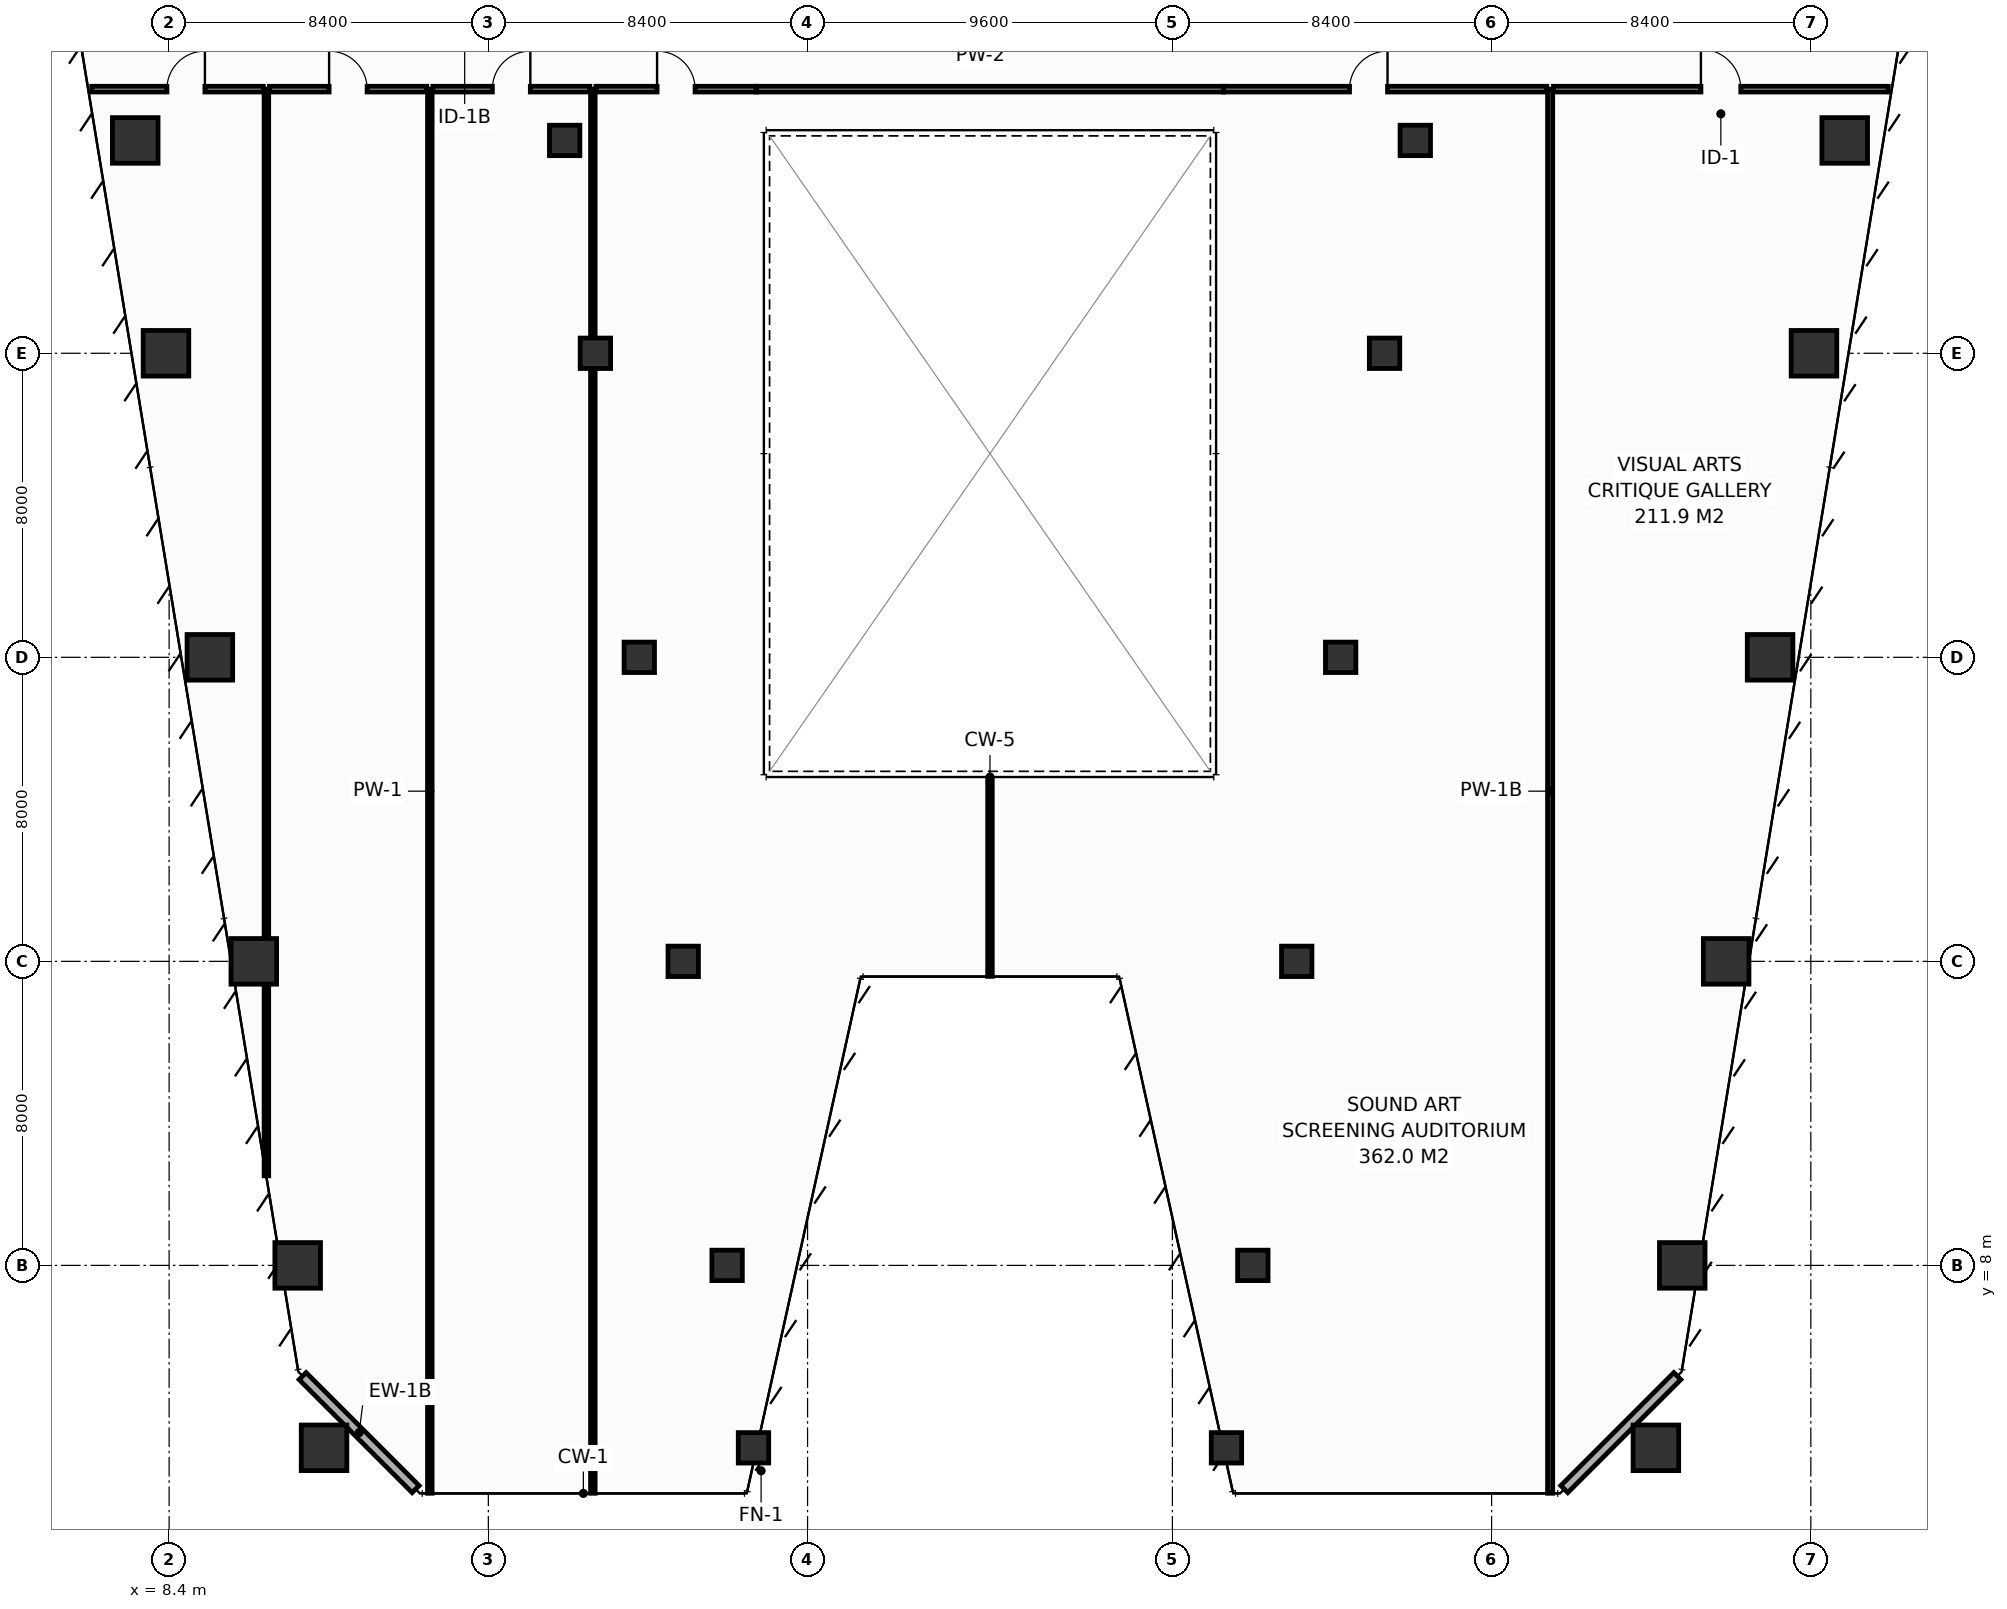
"""IFC4 building model, lengths in metres.
Left out: names, types, materials, properties, quantities, classifications, styles, units other than length and angle.
Written with IfcOpenShell. Run it as: python <this file> out.ifc"""

import sys

from ifc_helpers import new_model, si_unit, direction, frame, frame_2d, origin, origin_2d, place, context, subcontext, project, spatial, rectangle, hollow_rectangle, extrude, element, fill, save


model = new_model("IFC4")
c1 = context("Model", 3, precision=1e-05, world=origin(), true_north=direction((0.0, 1.0)))
c2 = subcontext(c1, "Body", "Model", "MODEL_VIEW")
j1 = project(units=[si_unit("LENGTHUNIT", "METRE"), si_unit("PLANEANGLEUNIT", "RADIAN")], contexts=[c1])
p1 = place(None, origin())
s1 = spatial("IfcSite", under=j1, at=p1, CompositionType="ELEMENT")
p2 = place(p1, origin())
s2 = spatial("IfcBuilding", under=s1, at=p2, CompositionType="ELEMENT")
p3 = place(p2, frame((0.0, 0.0, 82.4)))
s3 = spatial("IfcBuildingStorey", under=s2, at=p3, CompositionType="ELEMENT", Elevation=82.4)
for number, where, z_axis, x_axis in (
    (1, (12.477, 3.2, 0.0), (0.0, 0.0, 1.0), (1.0, 0.0, 0.0)),
    (2, (47.523, 3.2, 0.0), (0.0, 0.0, 1.0), (1.0, 0.0, 0.0)),
):
    element("IfcColumn", number, at=place(p3, frame(where, z_axis=z_axis, x_axis=x_axis)), inside=s3, PredefinedType="COLUMN", context=c2, shape_type="SweptSolid", body=[
        extrude(hollow_rectangle(XDim=1.2, YDim=1.2, WallThickness=0.055, at=origin_2d()), origin(), (0.0, 0.0, 1.0), 4.4),
    ])
for number, where, z_axis, x_axis in (
    (3, (23.777, 3.2, 0.0), (0.0, 0.0, 1.0), (1.0, 0.0, 0.0)),
    (4, (36.223, 3.2, 0.0), (0.0, 0.0, 1.0), (1.0, 0.0, 0.0)),
):
    element("IfcColumn", number, at=place(p3, frame(where, z_axis=z_axis, x_axis=x_axis)), inside=s3, PredefinedType="COLUMN", context=c2, shape_type="SweptSolid", body=[
        extrude(hollow_rectangle(XDim=0.8, YDim=0.8, WallThickness=0.036, at=origin_2d()), origin(), (0.0, 0.0, 1.0), 4.4),
    ])
for number, where, z_axis, x_axis in (
    (5, (11.783, 8.0, 0.0), (0.0, 0.0, 1.0), (1.0, 0.0, 0.0)),
    (6, (48.217, 8.0, 0.0), (0.0, 0.0, 1.0), (1.0, 0.0, 0.0)),
):
    element("IfcColumn", number, at=place(p3, frame(where, z_axis=z_axis, x_axis=x_axis)), inside=s3, PredefinedType="COLUMN", context=c2, shape_type="SweptSolid", body=[
        extrude(hollow_rectangle(XDim=1.2, YDim=1.2, WallThickness=0.055, at=origin_2d()), origin(), (0.0, 0.0, 1.0), 4.4),
    ])
for number, where, z_axis, x_axis in (
    (7, (23.083, 8.0, 0.0), (0.0, 0.0, 1.0), (1.0, 0.0, 0.0)),
    (8, (36.917, 8.0, 0.0), (0.0, 0.0, 1.0), (1.0, 0.0, 0.0)),
):
    element("IfcColumn", number, at=place(p3, frame(where, z_axis=z_axis, x_axis=x_axis)), inside=s3, PredefinedType="COLUMN", context=c2, shape_type="SweptSolid", body=[
        extrude(hollow_rectangle(XDim=0.8, YDim=0.8, WallThickness=0.036, at=origin_2d()), origin(), (0.0, 0.0, 1.0), 4.4),
    ])
for number, where, z_axis, x_axis in (
    (9, (10.628, 16.0, 0.0), (0.0, 0.0, 1.0), (1.0, 0.0, 0.0)),
    (10, (49.372, 16.0, 0.0), (0.0, 0.0, 1.0), (1.0, 0.0, 0.0)),
):
    element("IfcColumn", number, at=place(p3, frame(where, z_axis=z_axis, x_axis=x_axis)), inside=s3, PredefinedType="COLUMN", context=c2, shape_type="SweptSolid", body=[
        extrude(hollow_rectangle(XDim=1.2, YDim=1.2, WallThickness=0.055, at=origin_2d()), origin(), (0.0, 0.0, 1.0), 4.4),
    ])
for number, where, z_axis, x_axis in (
    (11, (21.928, 16.0, 0.0), (0.0, 0.0, 1.0), (1.0, 0.0, 0.0)),
    (12, (38.072, 16.0, 0.0), (0.0, 0.0, 1.0), (1.0, 0.0, 0.0)),
):
    element("IfcColumn", number, at=place(p3, frame(where, z_axis=z_axis, x_axis=x_axis)), inside=s3, PredefinedType="COLUMN", context=c2, shape_type="SweptSolid", body=[
        extrude(hollow_rectangle(XDim=0.8, YDim=0.8, WallThickness=0.036, at=origin_2d()), origin(), (0.0, 0.0, 1.0), 4.4),
    ])
for number, where, z_axis, x_axis in (
    (13, (9.472, 24.0, 0.0), (0.0, 0.0, 1.0), (1.0, 0.0, 0.0)),
    (14, (50.528, 24.0, 0.0), (0.0, 0.0, 1.0), (1.0, 0.0, 0.0)),
):
    element("IfcColumn", number, at=place(p3, frame(where, z_axis=z_axis, x_axis=x_axis)), inside=s3, PredefinedType="COLUMN", context=c2, shape_type="SweptSolid", body=[
        extrude(hollow_rectangle(XDim=1.2, YDim=1.2, WallThickness=0.055, at=origin_2d()), origin(), (0.0, 0.0, 1.0), 4.4),
    ])
for number, where, z_axis, x_axis in (
    (15, (20.772, 24.0, 0.0), (0.0, 0.0, 1.0), (1.0, 0.0, 0.0)),
    (16, (39.228, 24.0, 0.0), (0.0, 0.0, 1.0), (1.0, 0.0, 0.0)),
):
    element("IfcColumn", number, at=place(p3, frame(where, z_axis=z_axis, x_axis=x_axis)), inside=s3, PredefinedType="COLUMN", context=c2, shape_type="SweptSolid", body=[
        extrude(hollow_rectangle(XDim=0.8, YDim=0.8, WallThickness=0.036, at=origin_2d()), origin(), (0.0, 0.0, 1.0), 4.4),
    ])
for number, where, z_axis, x_axis in (
    (17, (8.317, 32.0, 0.0), (0.0, 0.0, 1.0), (1.0, 0.0, 0.0)),
    (18, (51.683, 32.0, 0.0), (0.0, 0.0, 1.0), (1.0, 0.0, 0.0)),
):
    element("IfcColumn", number, at=place(p3, frame(where, z_axis=z_axis, x_axis=x_axis)), inside=s3, PredefinedType="COLUMN", context=c2, shape_type="SweptSolid", body=[
        extrude(hollow_rectangle(XDim=1.2, YDim=1.2, WallThickness=0.055, at=origin_2d()), origin(), (0.0, 0.0, 1.0), 4.4),
    ])
for number, where, z_axis, x_axis in (
    (19, (19.617, 32.0, 0.0), (0.0, 0.0, 1.0), (1.0, 0.0, 0.0)),
    (20, (40.383, 32.0, 0.0), (0.0, 0.0, 1.0), (1.0, 0.0, 0.0)),
):
    element("IfcColumn", number, at=place(p3, frame(where, z_axis=z_axis, x_axis=x_axis)), inside=s3, PredefinedType="COLUMN", context=c2, shape_type="SweptSolid", body=[
        extrude(hollow_rectangle(XDim=0.8, YDim=0.8, WallThickness=0.036, at=origin_2d()), origin(), (0.0, 0.0, 1.0), 4.4),
    ])
for number, where, z_axis, x_axis in (
    (21, (7.508, 37.6, 0.0), (0.0, 0.0, 1.0), (1.0, 0.0, 0.0)),
    (22, (52.492, 37.6, 0.0), (0.0, 0.0, 1.0), (1.0, 0.0, 0.0)),
):
    element("IfcColumn", number, at=place(p3, frame(where, z_axis=z_axis, x_axis=x_axis)), inside=s3, PredefinedType="COLUMN", context=c2, shape_type="SweptSolid", body=[
        extrude(hollow_rectangle(XDim=1.2, YDim=1.2, WallThickness=0.055, at=origin_2d()), origin(), (0.0, 0.0, 1.0), 4.4),
    ])
for number, where, z_axis, x_axis in (
    (23, (18.808, 37.6, 0.0), (0.0, 0.0, 1.0), (1.0, 0.0, 0.0)),
    (24, (41.192, 37.6, 0.0), (0.0, 0.0, 1.0), (1.0, 0.0, 0.0)),
):
    element("IfcColumn", number, at=place(p3, frame(where, z_axis=z_axis, x_axis=x_axis)), inside=s3, PredefinedType="COLUMN", context=c2, shape_type="SweptSolid", body=[
        extrude(hollow_rectangle(XDim=0.8, YDim=0.8, WallThickness=0.036, at=origin_2d()), origin(), (0.0, 0.0, 1.0), 4.4),
    ])
for number, where, z_axis, x_axis in (
    (25, (11.913, 5.087, 0.0), (0.0, 0.0, 1.0), (0.707, -0.707, 0.0)),
    (26, (45.113, 2.113, 0.0), (0.0, 0.0, 1.0), (0.707, 0.707, 0.0)),
):
    element("IfcWall", number, at=place(p3, frame(where, z_axis=z_axis, x_axis=x_axis)), inside=s3, PredefinedType="STANDARD", context=c2, shape_type="SweptSolid", body=[
        extrude(rectangle(XDim=4.206, YDim=0.26, at=frame_2d((2.103, 0.0))), origin(), (0.0, 0.0, 1.0), 3.95),
    ])
p4 = place(p3, frame((10.96, 10.357, 0.0), z_axis=(0.0, 0.0, 1.0), x_axis=(0.0, 1.0, 0.0)))
e27 = element("IfcWall", 27, at=p4, inside=s3, PredefinedType="PARTITIONING", context=c2, shape_type="SweptSolid", body=[
    extrude(rectangle(XDim=28.593, YDim=0.12, at=frame_2d((14.296, 0.0))), origin(), (0.0, 0.0, 1.0), 3.135),
])
for number, where, z_axis, x_axis in (
    (28, (15.26, 2.005, 0.0), (0.0, 0.0, 1.0), (0.0, 1.0, 0.0)),
    (29, (19.55, 2.005, 0.0), (0.0, 0.0, 1.0), (0.0, 1.0, 0.0)),
):
    element("IfcWall", number, at=place(p3, frame(where, z_axis=z_axis, x_axis=x_axis)), inside=s3, PredefinedType="PARTITIONING", context=c2, shape_type="SweptSolid", body=[
        extrude(rectangle(XDim=36.945, YDim=0.12, at=frame_2d((18.473, 0.0))), origin(), (0.0, 0.0, 1.0), 3.135),
    ])
p5 = place(p3, frame((44.74, 2.005, 0.0), z_axis=(0.0, 0.0, 1.0), x_axis=(0.0, 1.0, 0.0)))
e30 = element("IfcWall", 30, at=p5, inside=s3, PredefinedType="PARTITIONING", context=c2, shape_type="SweptSolid", body=[
    extrude(rectangle(XDim=36.945, YDim=0.135, at=frame_2d((18.473, 0.0))), origin(), (0.0, 0.0, 1.0), 3.135),
])
p6 = place(p3, frame((30.0, 15.605, 0.0), z_axis=(0.0, 0.0, 1.0), x_axis=(0.0, 1.0, 0.0)))
e31 = element("IfcWall", 31, at=p6, inside=s3, PredefinedType="PARTITIONING", context=c2, shape_type="SweptSolid", body=[
    extrude(rectangle(XDim=5.175, YDim=0.12, at=frame_2d((2.587, 0.0))), origin(), (0.0, 0.0, 1.0), 3.95),
])
p7 = place(p3, frame((6.363, 38.95, 0.0), z_axis=(0.0, 0.0, 1.0), x_axis=(1.0, 0.0, 0.0)))
e32 = element("IfcWall", 32, at=p7, inside=s3, PredefinedType="PARTITIONING", context=c2, shape_type="SweptSolid", body=[
    extrude(rectangle(XDim=4.517, YDim=0.15, at=frame_2d((2.259, 0.0))), origin(), (0.0, 0.0, 1.0), 3.435),
])
p8 = place(p7, frame((1.979, 0.0, 0.0)))
e33 = element("IfcOpeningElement", 33, at=p8, cuts=e32, PredefinedType="OPENING", context=c2, shape_type="SweptSolid", body=[
    extrude(rectangle(XDim=1.0, YDim=2.15, at=frame_2d((0.5, 1.075))), frame((0.0, 0.085, 0.0), z_axis=(0.0, -1.0, 0.0), x_axis=(1.0, 0.0, 0.0)), (0.0, 0.0, 1.0), 0.17),
])
p9 = place(p3, frame((11.04, 38.95, 0.0), z_axis=(0.0, 0.0, 1.0), x_axis=(1.0, 0.0, 0.0)))
e34 = element("IfcWall", 34, at=p9, inside=s3, PredefinedType="PARTITIONING", context=c2, shape_type="SweptSolid", body=[
    extrude(rectangle(XDim=4.14, YDim=0.15, at=frame_2d((2.07, 0.0))), origin(), (0.0, 0.0, 1.0), 3.95),
])
p10 = place(p9, frame((1.57, 0.0, 0.0)))
e35 = element("IfcOpeningElement", 35, at=p10, cuts=e34, PredefinedType="OPENING", context=c2, shape_type="SweptSolid", body=[
    extrude(rectangle(XDim=1.0, YDim=2.15, at=frame_2d((0.5, 1.075))), frame((0.0, 0.085, 0.0), z_axis=(0.0, -1.0, 0.0), x_axis=(1.0, 0.0, 0.0)), (0.0, 0.0, 1.0), 0.17),
])
p11 = place(p3, frame((15.34, 38.95, 0.0), z_axis=(0.0, 0.0, 1.0), x_axis=(1.0, 0.0, 0.0)))
e36 = element("IfcWall", 36, at=p11, inside=s3, PredefinedType="PARTITIONING", context=c2, shape_type="SweptSolid", body=[
    extrude(rectangle(XDim=4.13, YDim=0.15, at=frame_2d((2.065, 0.0))), origin(), (0.0, 0.0, 1.0), 3.95),
])
p12 = place(p11, frame((1.565, 0.0, 0.0)))
e37 = element("IfcOpeningElement", 37, at=p12, cuts=e36, PredefinedType="OPENING", context=c2, shape_type="SweptSolid", body=[
    extrude(rectangle(XDim=1.0, YDim=2.15, at=frame_2d((0.5, 1.075))), frame((0.0, 0.085, 0.0), z_axis=(0.0, -1.0, 0.0), x_axis=(1.0, 0.0, 0.0)), (0.0, 0.0, 1.0), 0.17),
])
p13 = place(p3, frame((19.63, 38.95, 0.0), z_axis=(0.0, 0.0, 1.0), x_axis=(1.0, 0.0, 0.0)))
e38 = element("IfcWall", 38, at=p13, inside=s3, PredefinedType="PARTITIONING", context=c2, shape_type="SweptSolid", body=[
    extrude(rectangle(XDim=4.22, YDim=0.15, at=frame_2d((2.11, 0.0))), origin(), (0.0, 0.0, 1.0), 3.135),
])
p14 = place(p13, frame((1.61, 0.0, 0.0)))
e39 = element("IfcOpeningElement", 39, at=p14, cuts=e38, PredefinedType="OPENING", context=c2, shape_type="SweptSolid", body=[
    extrude(rectangle(XDim=1.0, YDim=2.15, at=frame_2d((0.5, 1.075))), frame((0.0, 0.085, 0.0), z_axis=(0.0, -1.0, 0.0), x_axis=(1.0, 0.0, 0.0)), (0.0, 0.0, 1.0), 0.17),
])
p15 = place(p3, frame((23.85, 38.95, 0.0), z_axis=(0.0, 0.0, 1.0), x_axis=(1.0, 0.0, 0.0)))
e40 = element("IfcWall", 40, at=p15, inside=s3, PredefinedType="PARTITIONING", context=c2, shape_type="SweptSolid", body=[
    extrude(rectangle(XDim=12.3, YDim=0.15, at=frame_2d((6.15, 0.0))), origin(), (0.0, 0.0, 1.0), 3.95),
])
p16 = place(p3, frame((36.15, 38.95, 0.0), z_axis=(0.0, 0.0, 1.0), x_axis=(1.0, 0.0, 0.0)))
e41 = element("IfcWall", 41, at=p16, inside=s3, PredefinedType="PARTITIONING", context=c2, shape_type="SweptSolid", body=[
    extrude(rectangle(XDim=8.503, YDim=0.15, at=frame_2d((4.251, 0.0))), origin(), (0.0, 0.0, 1.0), 3.135),
])
p17 = place(p16, frame((3.311, 0.0, 0.0)))
e42 = element("IfcOpeningElement", 42, at=p17, cuts=e41, PredefinedType="OPENING", context=c2, shape_type="SweptSolid", body=[
    extrude(rectangle(XDim=1.0, YDim=2.15, at=frame_2d((0.5, 1.075))), frame((0.0, 0.085, 0.0), z_axis=(0.0, -1.0, 0.0), x_axis=(1.0, 0.0, 0.0)), (0.0, 0.0, 1.0), 0.17),
])
p18 = place(p3, frame((44.827, 38.95, 0.0), z_axis=(0.0, 0.0, 1.0), x_axis=(1.0, 0.0, 0.0)))
e43 = element("IfcWall", 43, at=p18, inside=s3, PredefinedType="PARTITIONING", context=c2, shape_type="SweptSolid", body=[
    extrude(rectangle(XDim=8.81, YDim=0.15, at=frame_2d((4.405, 0.0))), origin(), (0.0, 0.0, 1.0), 3.435),
])
p19 = place(p18, frame((3.88, 0.0, 0.0)))
e44 = element("IfcOpeningElement", 44, at=p19, cuts=e43, PredefinedType="OPENING", context=c2, shape_type="SweptSolid", body=[
    extrude(rectangle(XDim=1.05, YDim=2.15, at=frame_2d((0.525, 1.075))), frame((0.0, 0.085, 0.0), z_axis=(0.0, -1.0, 0.0), x_axis=(1.0, 0.0, 0.0)), (0.0, 0.0, 1.0), 0.17),
])
p20 = place(p8, origin())
e45 = element("IfcDoor", 45, at=p20, inside=s3, OperationType="SINGLE_SWING_RIGHT", PredefinedType="DOOR", context=c2, shape_type="SweptSolid", body=[
    extrude(rectangle(XDim=1.0, YDim=2.15, at=frame_2d((0.5, 1.075))), frame((0.0, 0.025, 0.0), z_axis=(0.0, -1.0, 0.0), x_axis=(1.0, 0.0, 0.0)), (0.0, 0.0, 1.0), 0.05),
])
fill(e33, e45)
p21 = place(p10, origin())
e46 = element("IfcDoor", 46, at=p21, inside=s3, OperationType="SINGLE_SWING_LEFT", PredefinedType="DOOR", context=c2, shape_type="SweptSolid", body=[
    extrude(rectangle(XDim=1.0, YDim=2.15, at=frame_2d((0.5, 1.075))), frame((0.0, 0.025, 0.0), z_axis=(0.0, -1.0, 0.0), x_axis=(1.0, 0.0, 0.0)), (0.0, 0.0, 1.0), 0.05),
])
fill(e35, e46)
p22 = place(p12, origin())
e47 = element("IfcDoor", 47, at=p22, inside=s3, OperationType="SINGLE_SWING_RIGHT", PredefinedType="DOOR", context=c2, shape_type="SweptSolid", body=[
    extrude(rectangle(XDim=1.0, YDim=2.15, at=frame_2d((0.5, 1.075))), frame((0.0, 0.025, 0.0), z_axis=(0.0, -1.0, 0.0), x_axis=(1.0, 0.0, 0.0)), (0.0, 0.0, 1.0), 0.05),
])
fill(e37, e47)
p23 = place(p14, origin())
e48 = element("IfcDoor", 48, at=p23, inside=s3, OperationType="SINGLE_SWING_LEFT", PredefinedType="DOOR", context=c2, shape_type="SweptSolid", body=[
    extrude(rectangle(XDim=1.0, YDim=2.15, at=frame_2d((0.5, 1.075))), frame((0.0, 0.025, 0.0), z_axis=(0.0, -1.0, 0.0), x_axis=(1.0, 0.0, 0.0)), (0.0, 0.0, 1.0), 0.05),
])
fill(e39, e48)
p24 = place(p17, origin())
e49 = element("IfcDoor", 49, at=p24, inside=s3, OperationType="SINGLE_SWING_RIGHT", PredefinedType="DOOR", context=c2, shape_type="SweptSolid", body=[
    extrude(rectangle(XDim=1.0, YDim=2.15, at=frame_2d((0.5, 1.075))), frame((0.0, 0.025, 0.0), z_axis=(0.0, -1.0, 0.0), x_axis=(1.0, 0.0, 0.0)), (0.0, 0.0, 1.0), 0.05),
])
fill(e42, e49)
p25 = place(p19, origin())
e50 = element("IfcDoor", 50, at=p25, inside=s3, OperationType="SINGLE_SWING_LEFT", PredefinedType="DOOR", context=c2, shape_type="SweptSolid", body=[
    extrude(rectangle(XDim=1.05, YDim=2.15, at=frame_2d((0.525, 1.075))), frame((0.0, 0.025, 0.0), z_axis=(0.0, -1.0, 0.0), x_axis=(1.0, 0.0, 0.0)), (0.0, 0.0, 1.0), 0.05),
])
fill(e44, e50)
save(model, sys.argv[1])
